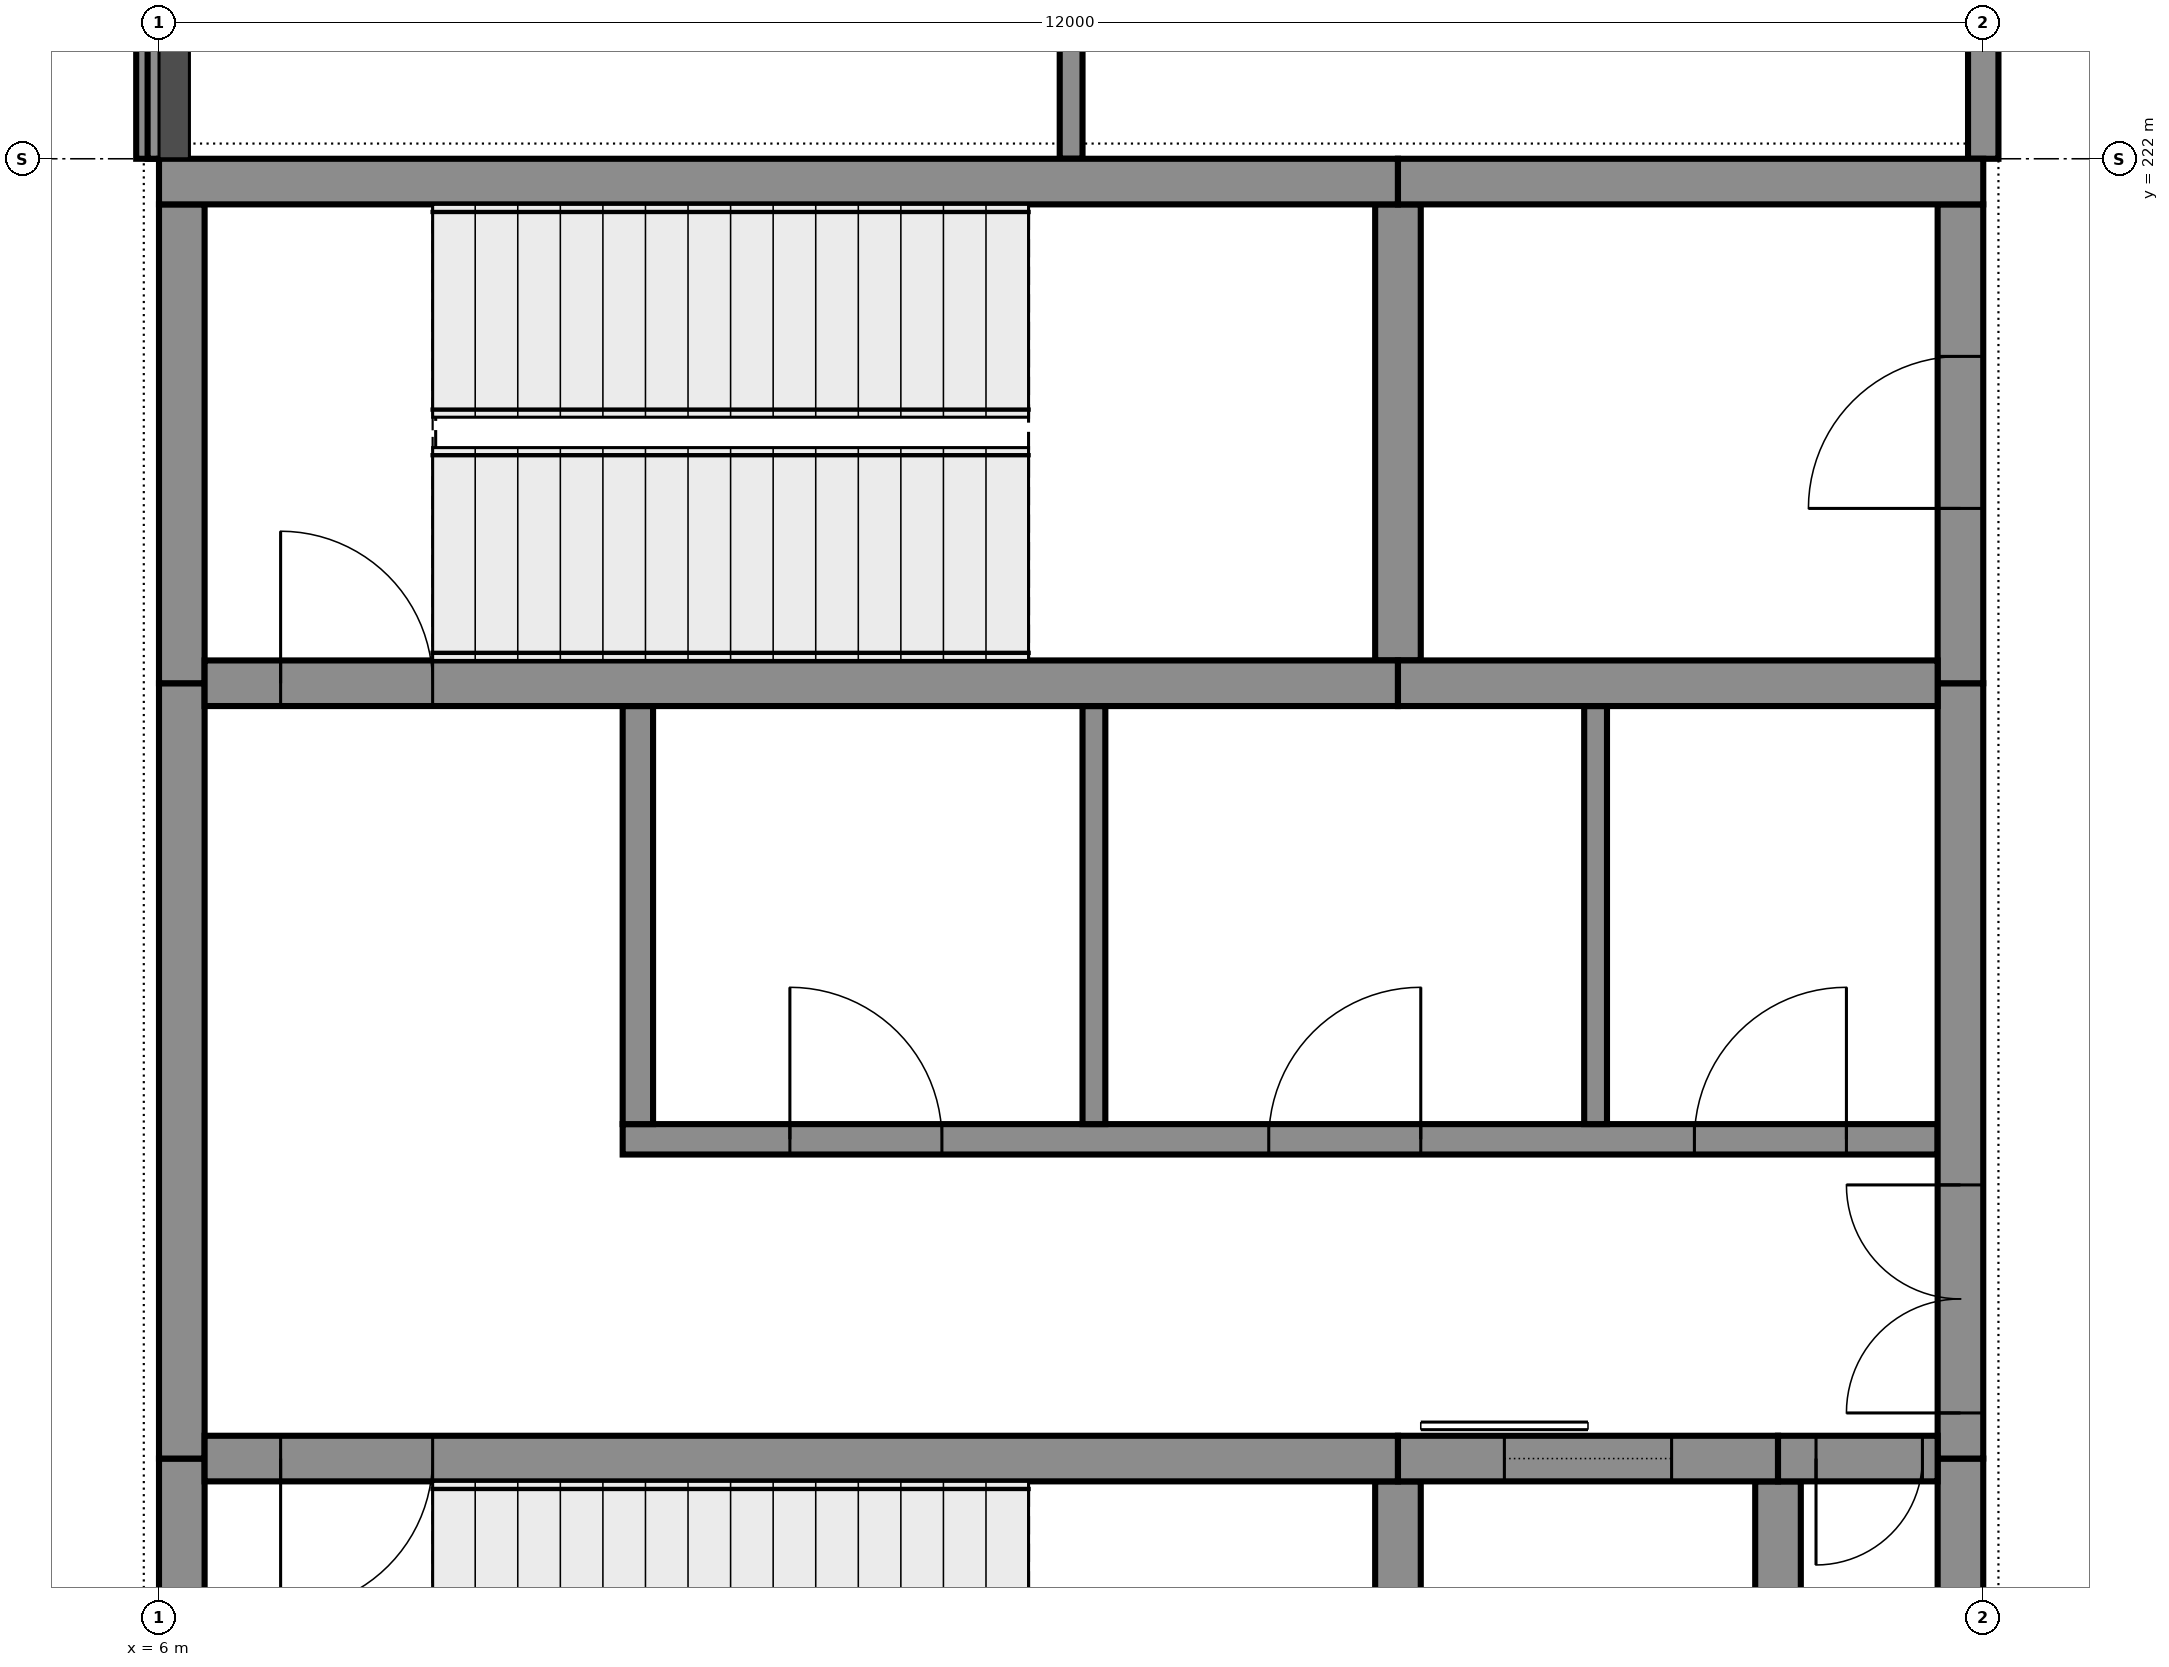
"""IFC4 building model, lengths in metres.
Left out: names, types, materials, properties, quantities, classifications, styles, units other than length and angle.
Written with IfcOpenShell. Run it as: python <this file> out.ifc"""

import sys

from ifc_helpers import new_model, si_unit, direction, frame, frame_2d, origin, place, context, subcontext, project, spatial, rectangle, extrude, element, fill, save


model = new_model("IFC4")
c1 = context("Model", 3, precision=1e-05, world=origin(), true_north=direction((0.0, 1.0)))
c2 = subcontext(c1, "Body", "Model", "MODEL_VIEW")
j1 = project(units=[si_unit("LENGTHUNIT", "METRE"), si_unit("PLANEANGLEUNIT", "RADIAN")], contexts=[c1])
p1 = place(None, origin())
s1 = spatial("IfcSite", under=j1, at=p1, CompositionType="ELEMENT")
p2 = place(p1, origin())
s2 = spatial("IfcBuilding", under=s1, at=p2, CompositionType="ELEMENT")
p3 = place(p2, frame((0.0, 0.0, 12.0)))
s3 = spatial("IfcBuildingStorey", under=s2, at=p3, CompositionType="ELEMENT", Elevation=12.0)
p4 = place(p3, frame((6.0, 221.85, 0.0), z_axis=(0.0, 0.0, 1.0), x_axis=(1.0, 0.0, 0.0)))
e1 = element("IfcWall", 1, at=p4, inside=s3, PredefinedType="SHEAR", context=c2, shape_type="SweptSolid", body=[
    extrude(rectangle(XDim=8.15, YDim=0.3, at=frame_2d((4.075, 0.0))), origin(), (0.0, 0.0, 1.0), 4.75),
])
p5 = place(p3, frame((14.15, 221.85, 0.0), z_axis=(0.0, 0.0, 1.0), x_axis=(1.0, 0.0, 0.0)))
e2 = element("IfcWall", 2, at=p5, inside=s3, PredefinedType="SHEAR", context=c2, shape_type="SweptSolid", body=[
    extrude(rectangle(XDim=3.85, YDim=0.3, at=frame_2d((1.925, 0.0))), origin(), (0.0, 0.0, 1.0), 4.75),
])
p6 = place(p3, frame((6.3, 213.45, 0.0), z_axis=(0.0, 0.0, 1.0), x_axis=(1.0, 0.0, 0.0)))
e3 = element("IfcWall", 3, at=p6, inside=s3, PredefinedType="SHEAR", context=c2, shape_type="SweptSolid", body=[
    extrude(rectangle(XDim=7.85, YDim=0.3, at=frame_2d((3.925, 0.0))), origin(), (0.0, 0.0, 1.0), 4.75),
])
p7 = place(p6, frame((0.5, 0.0, 0.0)))
e4 = element("IfcOpeningElement", 4, at=p7, cuts=e3, PredefinedType="OPENING", context=c2, shape_type="SweptSolid", body=[
    extrude(rectangle(XDim=1.0, YDim=2.1, at=frame_2d((0.5, 1.05))), frame((0.0, 0.16, 0.0), z_axis=(0.0, -1.0, 0.0), x_axis=(1.0, 0.0, 0.0)), (0.0, 0.0, 1.0), 0.32),
])
p8 = place(p3, frame((14.15, 213.45, 0.0), z_axis=(0.0, 0.0, 1.0), x_axis=(1.0, 0.0, 0.0)))
e5 = element("IfcWall", 5, at=p8, inside=s3, PredefinedType="SHEAR", context=c2, shape_type="SweptSolid", body=[
    extrude(rectangle(XDim=2.5, YDim=0.3, at=frame_2d((1.25, 0.0))), origin(), (0.0, 0.0, 1.0), 4.75),
])
p9 = place(p8, frame((0.7, 0.0, 0.0)))
e6 = element("IfcOpeningElement", 6, at=p9, cuts=e5, PredefinedType="OPENING", context=c2, shape_type="SweptSolid", body=[
    extrude(rectangle(XDim=1.1, YDim=2.1, at=frame_2d((0.55, 1.05))), frame((0.0, 0.16, 0.0), z_axis=(0.0, -1.0, 0.0), x_axis=(1.0, 0.0, 0.0)), (0.0, 0.0, 1.0), 0.32),
])
p10 = place(p3, frame((16.65, 213.45, 0.0), z_axis=(0.0, 0.0, 1.0), x_axis=(1.0, 0.0, 0.0)))
e7 = element("IfcWall", 7, at=p10, inside=s3, PredefinedType="SHEAR", context=c2, shape_type="SweptSolid", body=[
    extrude(rectangle(XDim=1.05, YDim=0.3, at=frame_2d((0.525, 0.0))), origin(), (0.0, 0.0, 1.0), 4.75),
])
p11 = place(p10, frame((0.25, 0.0, 0.0)))
e8 = element("IfcOpeningElement", 8, at=p11, cuts=e7, PredefinedType="OPENING", context=c2, shape_type="SweptSolid", body=[
    extrude(rectangle(XDim=0.7, YDim=2.1, at=frame_2d((0.35, 1.05))), frame((0.0, 0.16, 0.0), z_axis=(0.0, -1.0, 0.0), x_axis=(1.0, 0.0, 0.0)), (0.0, 0.0, 1.0), 0.32),
])
p12 = place(p3, frame((6.3, 218.55, 0.0), z_axis=(0.0, 0.0, 1.0), x_axis=(1.0, 0.0, 0.0)))
e9 = element("IfcWall", 9, at=p12, inside=s3, PredefinedType="SHEAR", context=c2, shape_type="SweptSolid", body=[
    extrude(rectangle(XDim=7.85, YDim=0.3, at=frame_2d((3.925, 0.0))), origin(), (0.0, 0.0, 1.0), 4.75),
])
p13 = place(p12, frame((0.5, 0.0, 0.0)))
e10 = element("IfcOpeningElement", 10, at=p13, cuts=e9, PredefinedType="OPENING", context=c2, shape_type="SweptSolid", body=[
    extrude(rectangle(XDim=1.0, YDim=2.1, at=frame_2d((0.5, 1.05))), frame((0.0, 0.16, 0.0), z_axis=(0.0, -1.0, 0.0), x_axis=(1.0, 0.0, 0.0)), (0.0, 0.0, 1.0), 0.32),
])
p14 = place(p3, frame((14.15, 218.55, 0.0), z_axis=(0.0, 0.0, 1.0), x_axis=(1.0, 0.0, 0.0)))
e11 = element("IfcWall", 11, at=p14, inside=s3, PredefinedType="SHEAR", context=c2, shape_type="SweptSolid", body=[
    extrude(rectangle(XDim=3.55, YDim=0.3, at=frame_2d((1.775, 0.0))), origin(), (0.0, 0.0, 1.0), 4.75),
])
p15 = place(p3, frame((6.15, 210.0, 0.0), z_axis=(0.0, 0.0, 1.0), x_axis=(0.0, 1.0, 0.0)))
e12 = element("IfcWall", 12, at=p15, inside=s3, PredefinedType="SHEAR", context=c2, shape_type="SweptSolid", body=[
    extrude(rectangle(XDim=3.45, YDim=0.3, at=frame_2d((1.725, 0.0))), origin(), (0.0, 0.0, 1.0), 4.75),
])
p16 = place(p3, frame((6.15, 213.45, 0.0), z_axis=(0.0, 0.0, 1.0), x_axis=(0.0, 1.0, 0.0)))
e13 = element("IfcWall", 13, at=p16, inside=s3, PredefinedType="SHEAR", context=c2, shape_type="SweptSolid", body=[
    extrude(rectangle(XDim=5.1, YDim=0.3, at=frame_2d((2.55, 0.0))), origin(), (0.0, 0.0, 1.0), 4.75),
])
for number, where, z_axis, x_axis in (
    (14, (6.15, 218.55, 0.0), (0.0, 0.0, 1.0), (0.0, 1.0, 0.0)),
    (15, (17.85, 210.3, 0.0), (0.0, 0.0, 1.0), (0.0, 1.0, 0.0)),
):
    element("IfcWall", number, at=place(p3, frame(where, z_axis=z_axis, x_axis=x_axis)), inside=s3, PredefinedType="SHEAR", context=c2, shape_type="SweptSolid", body=[
        extrude(rectangle(XDim=3.15, YDim=0.3, at=frame_2d((1.575, 0.0))), origin(), (0.0, 0.0, 1.0), 4.75),
    ])
p17 = place(p3, frame((17.85, 213.45, 0.0), z_axis=(0.0, 0.0, 1.0), x_axis=(0.0, 1.0, 0.0)))
e16 = element("IfcWall", 16, at=p17, inside=s3, PredefinedType="SHEAR", context=c2, shape_type="SweptSolid", body=[
    extrude(rectangle(XDim=5.1, YDim=0.3, at=frame_2d((2.55, 0.0))), origin(), (0.0, 0.0, 1.0), 4.75),
])
p18 = place(p17, frame((0.3, 0.0, 0.0)))
e17 = element("IfcOpeningElement", 17, at=p18, cuts=e16, PredefinedType="OPENING", context=c2, shape_type="SweptSolid", body=[
    extrude(rectangle(XDim=1.5, YDim=2.1, at=frame_2d((0.75, 1.05))), frame((0.0, 0.16, 0.0), z_axis=(0.0, -1.0, 0.0), x_axis=(1.0, 0.0, 0.0)), (0.0, 0.0, 1.0), 0.32),
])
p19 = place(p3, frame((17.85, 218.55, 0.0), z_axis=(0.0, 0.0, 1.0), x_axis=(0.0, 1.0, 0.0)))
e18 = element("IfcWall", 18, at=p19, inside=s3, PredefinedType="SHEAR", context=c2, shape_type="SweptSolid", body=[
    extrude(rectangle(XDim=3.15, YDim=0.3, at=frame_2d((1.575, 0.0))), origin(), (0.0, 0.0, 1.0), 4.75),
])
p20 = place(p19, frame((1.15, 0.0, 0.0)))
e19 = element("IfcOpeningElement", 19, at=p20, cuts=e18, PredefinedType="OPENING", context=c2, shape_type="SweptSolid", body=[
    extrude(rectangle(XDim=1.0, YDim=2.1, at=frame_2d((0.5, 1.05))), frame((0.0, 0.16, 0.0), z_axis=(0.0, -1.0, 0.0), x_axis=(1.0, 0.0, 0.0)), (0.0, 0.0, 1.0), 0.32),
])
p21 = place(p3, frame((14.15, 210.0, 0.0), z_axis=(0.0, 0.0, 1.0), x_axis=(0.0, 1.0, 0.0)))
e20 = element("IfcWall", 20, at=p21, inside=s3, PredefinedType="SHEAR", context=c2, shape_type="SweptSolid", body=[
    extrude(rectangle(XDim=3.3, YDim=0.3, at=frame_2d((1.65, 0.0))), origin(), (0.0, 0.0, 1.0), 4.75),
])
for number, where, z_axis, x_axis in (
    (21, (14.15, 218.7, 0.0), (0.0, 0.0, 1.0), (0.0, 1.0, 0.0)),
    (22, (16.65, 210.3, 0.0), (0.0, 0.0, 1.0), (0.0, 1.0, 0.0)),
):
    element("IfcWall", number, at=place(p3, frame(where, z_axis=z_axis, x_axis=x_axis)), inside=s3, PredefinedType="SHEAR", context=c2, shape_type="SweptSolid", body=[
        extrude(rectangle(XDim=3.0, YDim=0.3, at=frame_2d((1.5, 0.0))), origin(), (0.0, 0.0, 1.0), 4.75),
    ])
p22 = place(p3, frame((5.925, 233.5, 4.75), z_axis=(0.0, 0.0, 1.0), x_axis=(0.0, -1.0, 0.0)))
e23 = element("IfcWall", 23, at=p22, inside=s3, PredefinedType="STANDARD", context=c2, shape_type="SweptSolid", body=[
    extrude(rectangle(XDim=11.5, YDim=0.15, at=frame_2d((5.75, 0.0))), origin(), (0.0, 0.0, 1.0), 0.25),
])
p23 = place(p3, frame((9.05, 215.55, 0.0), z_axis=(0.0, 0.0, 1.0), x_axis=(1.0, 0.0, 0.0)))
e24 = element("IfcWall", 24, at=p23, inside=s3, PredefinedType="PARTITIONING", context=c2, shape_type="SweptSolid", body=[
    extrude(rectangle(XDim=8.65, YDim=0.2, at=frame_2d((4.325, 0.0))), origin(), (0.0, 0.0, 1.0), 4.75),
])
p24 = place(p23, frame((1.1, 0.0, 0.0)))
e25 = element("IfcOpeningElement", 25, at=p24, cuts=e24, PredefinedType="OPENING", context=c2, shape_type="SweptSolid", body=[
    extrude(rectangle(XDim=1.0, YDim=2.1, at=frame_2d((0.5, 1.05))), frame((0.0, 0.11, 0.0), z_axis=(0.0, -1.0, 0.0), x_axis=(1.0, 0.0, 0.0)), (0.0, 0.0, 1.0), 0.22),
])
p25 = place(p23, frame((4.25, 0.0, 0.0)))
e26 = element("IfcOpeningElement", 26, at=p25, cuts=e24, PredefinedType="OPENING", context=c2, shape_type="SweptSolid", body=[
    extrude(rectangle(XDim=1.0, YDim=2.1, at=frame_2d((0.5, 1.05))), frame((0.0, 0.11, 0.0), z_axis=(0.0, -1.0, 0.0), x_axis=(1.0, 0.0, 0.0)), (0.0, 0.0, 1.0), 0.22),
])
p26 = place(p23, frame((7.05, 0.0, 0.0)))
e27 = element("IfcOpeningElement", 27, at=p26, cuts=e24, PredefinedType="OPENING", context=c2, shape_type="SweptSolid", body=[
    extrude(rectangle(XDim=1.0, YDim=2.1, at=frame_2d((0.5, 1.05))), frame((0.0, 0.11, 0.0), z_axis=(0.0, -1.0, 0.0), x_axis=(1.0, 0.0, 0.0)), (0.0, 0.0, 1.0), 0.22),
])
p27 = place(p3, frame((6.0, 222.0, 0.0), z_axis=(0.0, 0.0, 1.0), x_axis=(0.0, 1.0, 0.0)))
e28 = element("IfcWall", 28, at=p27, inside=s3, PredefinedType="PARTITIONING", context=c2, shape_type="SweptSolid", body=[
    extrude(rectangle(XDim=7.1, YDim=0.15, at=frame_2d((3.55, 0.0))), origin(), (0.0, 0.0, 1.0), 3.75),
])
p28 = place(p3, frame((9.15, 215.65, 0.0), z_axis=(0.0, 0.0, 1.0), x_axis=(0.0, 1.0, 0.0)))
e29 = element("IfcWall", 29, at=p28, inside=s3, PredefinedType="PARTITIONING", context=c2, shape_type="SweptSolid", body=[
    extrude(rectangle(XDim=2.75, YDim=0.2, at=frame_2d((1.375, 0.0))), origin(), (0.0, 0.0, 1.0), 4.75),
])
p29 = place(p3, frame((12.0, 222.0, 0.0), z_axis=(0.0, 0.0, 1.0), x_axis=(0.0, 1.0, 0.0)))
e30 = element("IfcWall", 30, at=p29, inside=s3, PredefinedType="PARTITIONING", context=c2, shape_type="SweptSolid", body=[
    extrude(rectangle(XDim=7.1, YDim=0.15, at=frame_2d((3.55, 0.0))), origin(), (0.0, 0.0, 1.0), 4.75),
])
for number, where, z_axis, x_axis in (
    (31, (12.15, 215.65, 0.0), (0.0, 0.0, 1.0), (0.0, 1.0, 0.0)),
    (32, (15.45, 215.65, 0.0), (0.0, 0.0, 1.0), (0.0, 1.0, 0.0)),
):
    element("IfcWall", number, at=place(p3, frame(where, z_axis=z_axis, x_axis=x_axis)), inside=s3, PredefinedType="PARTITIONING", context=c2, shape_type="SweptSolid", body=[
        extrude(rectangle(XDim=2.75, YDim=0.15, at=frame_2d((1.375, 0.0))), origin(), (0.0, 0.0, 1.0), 4.75),
    ])
p30 = place(p3, frame((18.0, 222.0, 0.0), z_axis=(0.0, 0.0, 1.0), x_axis=(0.0, 1.0, 0.0)))
e33 = element("IfcWall", 33, at=p30, inside=s3, PredefinedType="PARTITIONING", context=c2, shape_type="SweptSolid", body=[
    extrude(rectangle(XDim=7.1, YDim=0.2, at=frame_2d((3.55, 0.0))), origin(), (0.0, 0.0, 1.0), 3.75),
])
p31 = place(p30, frame((3.1, 0.0, 0.0)))
e34 = element("IfcOpeningElement", 34, at=p31, cuts=e33, PredefinedType="OPENING", context=c2, shape_type="SweptSolid", body=[
    extrude(rectangle(XDim=1.0, YDim=2.1, at=frame_2d((0.5, 1.05))), frame((0.0, 0.11, 0.0), z_axis=(0.0, -1.0, 0.0), x_axis=(1.0, 0.0, 0.0)), (0.0, 0.0, 1.0), 0.22),
])
p32 = place(p7, frame((1.0, 0.0, 0.0), z_axis=(0.0, 0.0, 1.0), x_axis=(-1.0, 0.0, 0.0)))
e35 = element("IfcDoor", 35, at=p32, inside=s3, OperationType="SINGLE_SWING_LEFT", PredefinedType="DOOR", context=c2, shape_type="SweptSolid", body=[
    extrude(rectangle(XDim=1.0, YDim=2.1, at=frame_2d((0.5, 1.05))), frame((0.0, 0.025, 0.0), z_axis=(0.0, -1.0, 0.0), x_axis=(1.0, 0.0, 0.0)), (0.0, 0.0, 1.0), 0.05),
])
fill(e4, e35)
p33 = place(p9, origin())
e36 = element("IfcDoor", 36, at=p33, inside=s3, OperationType="SLIDING_TO_LEFT", PredefinedType="DOOR", context=c2, shape_type="SweptSolid", body=[
    extrude(rectangle(XDim=1.1, YDim=2.1, at=frame_2d((0.55, 1.05))), frame((0.0, 0.025, 0.0), z_axis=(0.0, -1.0, 0.0), x_axis=(1.0, 0.0, 0.0)), (0.0, 0.0, 1.0), 0.05),
])
fill(e6, e36)
p34 = place(p11, frame((0.7, 0.0, 0.0), z_axis=(0.0, 0.0, 1.0), x_axis=(-1.0, 0.0, 0.0)))
e37 = element("IfcDoor", 37, at=p34, inside=s3, OperationType="SINGLE_SWING_LEFT", PredefinedType="DOOR", context=c2, shape_type="SweptSolid", body=[
    extrude(rectangle(XDim=0.7, YDim=2.1, at=frame_2d((0.35, 1.05))), frame((0.0, 0.025, 0.0), z_axis=(0.0, -1.0, 0.0), x_axis=(1.0, 0.0, 0.0)), (0.0, 0.0, 1.0), 0.05),
])
fill(e8, e37)
p35 = place(p18, origin())
e38 = element("IfcDoor", 38, at=p35, inside=s3, OperationType="DOUBLE_DOOR_SINGLE_SWING", PredefinedType="DOOR", context=c2, shape_type="SweptSolid", body=[
    extrude(rectangle(XDim=1.5, YDim=2.1, at=frame_2d((0.75, 1.05))), frame((0.0, 0.025, 0.0), z_axis=(0.0, -1.0, 0.0), x_axis=(1.0, 0.0, 0.0)), (0.0, 0.0, 1.0), 0.05),
])
fill(e17, e38)
p36 = place(p24, origin())
e39 = element("IfcDoor", 39, at=p36, inside=s3, OperationType="SINGLE_SWING_RIGHT", PredefinedType="DOOR", context=c2, shape_type="SweptSolid", body=[
    extrude(rectangle(XDim=1.0, YDim=2.1, at=frame_2d((0.5, 1.05))), frame((0.0, 0.025, 0.0), z_axis=(0.0, -1.0, 0.0), x_axis=(1.0, 0.0, 0.0)), (0.0, 0.0, 1.0), 0.05),
])
fill(e25, e39)
p37 = place(p25, origin())
e40 = element("IfcDoor", 40, at=p37, inside=s3, OperationType="SINGLE_SWING_LEFT", PredefinedType="DOOR", context=c2, shape_type="SweptSolid", body=[
    extrude(rectangle(XDim=1.0, YDim=2.1, at=frame_2d((0.5, 1.05))), frame((0.0, 0.025, 0.0), z_axis=(0.0, -1.0, 0.0), x_axis=(1.0, 0.0, 0.0)), (0.0, 0.0, 1.0), 0.05),
])
fill(e26, e40)
p38 = place(p26, origin())
e41 = element("IfcDoor", 41, at=p38, inside=s3, OperationType="SINGLE_SWING_LEFT", PredefinedType="DOOR", context=c2, shape_type="SweptSolid", body=[
    extrude(rectangle(XDim=1.0, YDim=2.1, at=frame_2d((0.5, 1.05))), frame((0.0, 0.025, 0.0), z_axis=(0.0, -1.0, 0.0), x_axis=(1.0, 0.0, 0.0)), (0.0, 0.0, 1.0), 0.05),
])
fill(e27, e41)
p39 = place(p13, origin())
e42 = element("IfcDoor", 42, at=p39, inside=s3, OperationType="SINGLE_SWING_RIGHT", PredefinedType="DOOR", context=c2, shape_type="SweptSolid", body=[
    extrude(rectangle(XDim=1.0, YDim=2.1, at=frame_2d((0.5, 1.05))), frame((0.0, 0.025, 0.0), z_axis=(0.0, -1.0, 0.0), x_axis=(1.0, 0.0, 0.0)), (0.0, 0.0, 1.0), 0.05),
])
fill(e10, e42)
p40 = place(p20, origin())
e43 = element("IfcDoor", 43, at=p40, inside=s3, OperationType="SINGLE_SWING_RIGHT", PredefinedType="DOOR", context=c2, shape_type="SweptSolid", body=[
    extrude(rectangle(XDim=1.0, YDim=2.1, at=frame_2d((0.5, 1.05))), frame((0.0, 0.025, 0.0), z_axis=(0.0, -1.0, 0.0), x_axis=(1.0, 0.0, 0.0)), (0.0, 0.0, 1.0), 0.05),
])
fill(e19, e43)
save(model, sys.argv[1])
